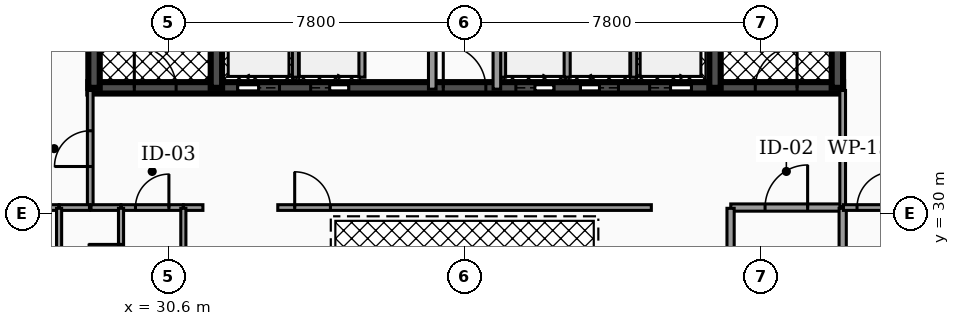
"""IFC4 building model, lengths in metres.
Left out: names, types, materials, properties, quantities, classifications, styles, units other than length and angle.
Written with IfcOpenShell. Run it as: python <this file> out.ifc"""

import sys

from ifc_helpers import new_model, si_unit, direction, frame, frame_2d, origin, place, context, subcontext, project, spatial, rectangle, extrude, element, fill, save


model = new_model("IFC4")
c1 = context("Model", 3, precision=1e-05, world=origin(), true_north=direction((0.0, 1.0)))
c2 = subcontext(c1, "Body", "Model", "MODEL_VIEW")
j1 = project(units=[si_unit("LENGTHUNIT", "METRE"), si_unit("PLANEANGLEUNIT", "RADIAN")], contexts=[c1])
p1 = place(None, origin())
s1 = spatial("IfcSite", under=j1, at=p1, CompositionType="ELEMENT")
p2 = place(p1, origin())
s2 = spatial("IfcBuilding", under=s1, at=p2, CompositionType="ELEMENT")
p3 = place(p2, frame((0.0, 0.0, 235.96)))
s3 = spatial("IfcBuildingStorey", under=s2, at=p3, CompositionType="ELEMENT", Elevation=235.96)
p4 = place(p3, frame((28.5, 33.3, 0.0), z_axis=(0.0, 0.0, 1.0), x_axis=(1.0, 0.0, 0.0)))
e1 = element("IfcWall", 1, at=p4, inside=s3, PredefinedType="SHEAR", context=c2, shape_type="SweptSolid", body=[
    extrude(rectangle(XDim=19.86, YDim=0.3, at=frame_2d((9.93, 0.0))), origin(), (0.0, 0.0, 1.0), 3.18),
])
p5 = place(p4, frame((3.93, 0.0, 0.0)))
e2 = element("IfcOpeningElement", 2, at=p5, cuts=e1, PredefinedType="OPENING", context=c2, shape_type="SweptSolid", body=[
    extrude(rectangle(XDim=1.1, YDim=2.15, at=frame_2d((0.55, 1.075))), frame((0.0, 0.16, 0.0), z_axis=(0.0, -1.0, 0.0), x_axis=(1.0, 0.0, 0.0)), (0.0, 0.0, 1.0), 0.32),
])
p6 = place(p4, frame((14.77, 0.0, 0.0)))
e3 = element("IfcOpeningElement", 3, at=p6, cuts=e1, PredefinedType="OPENING", context=c2, shape_type="SweptSolid", body=[
    extrude(rectangle(XDim=1.1, YDim=2.15, at=frame_2d((0.55, 1.075))), frame((0.0, 0.16, 0.0), z_axis=(0.0, -1.0, 0.0), x_axis=(1.0, 0.0, 0.0)), (0.0, 0.0, 1.0), 0.32),
])
p7 = place(p4, frame((11.25, 0.0, 0.0)))
e4 = element("IfcOpeningElement", 4, at=p7, cuts=e1, PredefinedType="OPENING", context=c2, shape_type="SweptSolid", body=[
    extrude(rectangle(XDim=1.0, YDim=2.1, at=frame_2d((0.5, 1.05))), frame((0.0, 0.16, 0.0), z_axis=(0.0, -1.0, 0.0), x_axis=(1.0, 0.0, 0.0)), (0.0, 0.0, 1.0), 0.32),
])
p8 = place(p4, frame((12.95, 0.0, 0.0)))
e5 = element("IfcOpeningElement", 5, at=p8, cuts=e1, PredefinedType="OPENING", context=c2, shape_type="SweptSolid", body=[
    extrude(rectangle(XDim=1.0, YDim=2.1, at=frame_2d((0.5, 1.05))), frame((0.0, 0.16, 0.0), z_axis=(0.0, -1.0, 0.0), x_axis=(1.0, 0.0, 0.0)), (0.0, 0.0, 1.0), 0.32),
])
p9 = place(p4, frame((5.85, 0.0, 0.0)))
e6 = element("IfcOpeningElement", 6, at=p9, cuts=e1, PredefinedType="OPENING", context=c2, shape_type="SweptSolid", body=[
    extrude(rectangle(XDim=1.0, YDim=2.1, at=frame_2d((0.5, 1.05))), frame((0.0, 0.16, 0.0), z_axis=(0.0, -1.0, 0.0), x_axis=(1.0, 0.0, 0.0)), (0.0, 0.0, 1.0), 0.32),
])
p10 = place(p4, frame((1.21, 0.0, 0.0)))
e7 = element("IfcOpeningElement", 7, at=p10, cuts=e1, PredefinedType="OPENING", context=c2, shape_type="SweptSolid", body=[
    extrude(rectangle(XDim=1.1, YDim=2.2, at=frame_2d((0.55, 1.1))), frame((0.0, 0.16, 0.0), z_axis=(0.0, -1.0, 0.0), x_axis=(1.0, 0.0, 0.0)), (0.0, 0.0, 1.0), 0.32),
])
p11 = place(p4, frame((9.34, 0.0, 0.0)))
e8 = element("IfcOpeningElement", 8, at=p11, cuts=e1, PredefinedType="OPENING", context=c2, shape_type="SweptSolid", body=[
    extrude(rectangle(XDim=1.12, YDim=2.05, at=frame_2d((0.56, 1.025))), frame((0.0, 0.16, 0.0), z_axis=(0.0, -1.0, 0.0), x_axis=(1.0, 0.0, 0.0)), (0.0, 0.0, 1.0), 0.32),
])
p12 = place(p4, frame((17.55, 0.0, 0.0)))
e9 = element("IfcOpeningElement", 9, at=p12, cuts=e1, PredefinedType="OPENING", context=c2, shape_type="SweptSolid", body=[
    extrude(rectangle(XDim=1.1, YDim=2.2, at=frame_2d((0.55, 1.1))), frame((0.0, 0.16, 0.0), z_axis=(0.0, -1.0, 0.0), x_axis=(1.0, 0.0, 0.0)), (0.0, 0.0, 1.0), 0.32),
])
for number, where, z_axis, x_axis in (
    (10, (28.65, 33.3, 0.0), (0.0, 0.0, 1.0), (0.0, 1.0, 0.0)),
    (11, (31.87, 33.3, 0.0), (0.0, 0.0, 1.0), (0.0, 1.0, 0.0)),
    (12, (44.99, 33.3, 0.0), (0.0, 0.0, 1.0), (0.0, 1.0, 0.0)),
    (13, (48.21, 33.3, 0.0), (0.0, 0.0, 1.0), (0.0, 1.0, 0.0)),
):
    element("IfcWall", number, at=place(p3, frame(where, z_axis=z_axis, x_axis=x_axis)), inside=s3, PredefinedType="SHEAR", context=c2, shape_type="SweptSolid", body=[
        extrude(rectangle(XDim=10.1, YDim=0.3, at=frame_2d((5.05, 0.0))), origin(), (0.0, 0.0, 1.0), 3.18),
    ])
for number, where, z_axis, x_axis in (
    (14, (33.95, 33.58, 0.0), (0.0, 0.0, 1.0), (0.0, 1.0, 0.0)),
    (15, (42.85, 33.58, 0.0), (0.0, 0.0, 1.0), (0.0, 1.0, 0.0)),
):
    element("IfcWall", number, at=place(p3, frame(where, z_axis=z_axis, x_axis=x_axis)), inside=s3, PredefinedType="SOLIDWALL", context=c2, shape_type="SweptSolid", body=[
        extrude(rectangle(XDim=2.45, YDim=0.16, at=frame_2d((1.225, 0.0))), origin(), (0.0, 0.0, 1.0), 3.18),
    ])
for number, where, z_axis, x_axis in (
    (16, (39.4, 33.58, 0.0), (0.0, 0.0, 1.0), (0.0, 1.0, 0.0)),
    (17, (41.1, 33.58, 0.0), (0.0, 0.0, 1.0), (0.0, 1.0, 0.0)),
    (18, (35.7, 33.58, 0.0), (0.0, 0.0, 1.0), (0.0, 1.0, 0.0)),
):
    element("IfcWall", number, at=place(p3, frame(where, z_axis=z_axis, x_axis=x_axis)), inside=s3, PredefinedType="SOLIDWALL", context=c2, shape_type="SweptSolid", body=[
        extrude(rectangle(XDim=2.25, YDim=0.16, at=frame_2d((1.125, 0.0))), origin(), (0.0, 0.0, 1.0), 3.18),
    ])
p13 = place(p3, frame((37.55, 33.265, 0.0), z_axis=(0.0, 0.0, 1.0), x_axis=(0.0, 1.0, 0.0)))
e19 = element("IfcWall", 19, at=p13, inside=s3, PredefinedType="PARTITIONING", context=c2, shape_type="SweptSolid", body=[
    extrude(rectangle(XDim=4.595, YDim=0.2, at=frame_2d((2.298, 0.0))), origin(), (0.0, 0.0, 1.0), 2.235),
])
p14 = place(p13, frame((1.857, 0.0, 0.0)))
e20 = element("IfcOpeningElement", 20, at=p14, cuts=e19, PredefinedType="OPENING", context=c2, shape_type="SweptSolid", body=[
    extrude(rectangle(XDim=0.88, YDim=2.05, at=frame_2d((0.44, 1.025))), frame((0.0, 0.11, 0.0), z_axis=(0.0, -1.0, 0.0), x_axis=(1.0, 0.0, 0.0)), (0.0, 0.0, 1.0), 0.22),
])
p15 = place(p3, frame((39.25, 33.265, 0.0), z_axis=(0.0, 0.0, 1.0), x_axis=(0.0, 1.0, 0.0)))
e21 = element("IfcWall", 21, at=p15, inside=s3, PredefinedType="PARTITIONING", context=c2, shape_type="SweptSolid", body=[
    extrude(rectangle(XDim=4.595, YDim=0.2, at=frame_2d((2.298, 0.0))), origin(), (0.0, 0.0, 1.0), 2.235),
])
p16 = place(p15, frame((3.058, 0.0, 0.0)))
e22 = element("IfcOpeningElement", 22, at=p16, cuts=e21, PredefinedType="OPENING", context=c2, shape_type="SweptSolid", body=[
    extrude(rectangle(XDim=0.88, YDim=2.05, at=frame_2d((0.44, 1.025))), frame((0.0, 0.11, 0.0), z_axis=(0.0, -1.0, 0.0), x_axis=(1.0, 0.0, 0.0)), (0.0, 0.0, 1.0), 0.22),
])
p17 = place(p3, frame((45.405, 30.15, 0.0), z_axis=(0.0, 0.0, 1.0), x_axis=(1.0, 0.0, 0.0)))
e23 = element("IfcWall", 23, at=p17, inside=s3, PredefinedType="PARTITIONING", context=c2, shape_type="SweptSolid", body=[
    extrude(rectangle(XDim=2.925, YDim=0.19, at=frame_2d((1.462, 0.0))), origin(), (0.0, 0.0, 1.0), 2.235),
])
p18 = place(p17, frame((0.903, 0.0, 0.0)))
e24 = element("IfcOpeningElement", 24, at=p18, cuts=e23, PredefinedType="OPENING", context=c2, shape_type="SweptSolid", body=[
    extrude(rectangle(XDim=1.12, YDim=2.05, at=frame_2d((0.56, 1.025))), frame((0.0, 0.105, 0.0), z_axis=(0.0, -1.0, 0.0), x_axis=(1.0, 0.0, 0.0)), (0.0, 0.0, 1.0), 0.21),
])
p19 = place(p3, frame((28.55, 30.17, 0.0), z_axis=(0.0, 0.0, 1.0), x_axis=(0.0, 1.0, 0.0)))
e25 = element("IfcWall", 25, at=p19, inside=s3, PredefinedType="PARTITIONING", context=c2, shape_type="SweptSolid", body=[
    extrude(rectangle(XDim=3.06, YDim=0.15, at=frame_2d((1.53, 0.0))), origin(), (0.0, 0.0, 1.0), 2.235),
])
p20 = place(p19, frame((1.06, 0.0, 0.0)))
e26 = element("IfcOpeningElement", 26, at=p20, cuts=e25, PredefinedType="OPENING", context=c2, shape_type="SweptSolid", body=[
    extrude(rectangle(XDim=0.94, YDim=2.05, at=frame_2d((0.47, 1.025))), frame((0.0, 0.085, 0.0), z_axis=(0.0, -1.0, 0.0), x_axis=(1.0, 0.0, 0.0)), (0.0, 0.0, 1.0), 0.17),
])
p21 = place(p3, frame((48.35, 30.17, 0.0), z_axis=(0.0, 0.0, 1.0), x_axis=(0.0, 1.0, 0.0)))
e27 = element("IfcWall", 27, at=p21, inside=s3, PredefinedType="PARTITIONING", context=c2, shape_type="SweptSolid", body=[
    extrude(rectangle(XDim=3.06, YDim=0.15, at=frame_2d((1.53, 0.0))), origin(), (0.0, 0.0, 1.0), 2.235),
])
p22 = place(p3, frame((29.365, 30.15, 0.0), z_axis=(0.0, 0.0, 1.0), x_axis=(1.0, 0.0, 0.0)))
e28 = element("IfcWall", 28, at=p22, inside=s3, PredefinedType="PARTITIONING", context=c2, shape_type="SweptSolid", body=[
    extrude(rectangle(XDim=1.63, YDim=0.15, at=frame_2d((0.815, 0.0))), origin(), (0.0, 0.0, 1.0), 2.235),
])
p23 = place(p22, frame((0.375, 0.0, 0.0)))
e29 = element("IfcOpeningElement", 29, at=p23, cuts=e28, PredefinedType="OPENING", context=c2, shape_type="SweptSolid", body=[
    extrude(rectangle(XDim=0.88, YDim=2.05, at=frame_2d((0.44, 1.025))), frame((0.0, 0.085, 0.0), z_axis=(0.0, -1.0, 0.0), x_axis=(1.0, 0.0, 0.0)), (0.0, 0.0, 1.0), 0.17),
])
p24 = place(p3, frame((28.57, 30.15, 0.0), z_axis=(0.0, 0.0, 1.0), x_axis=(1.0, 0.0, 0.0)))
e30 = element("IfcWall", 30, at=p24, inside=s3, PredefinedType="PARTITIONING", context=c2, shape_type="SweptSolid", body=[
    extrude(rectangle(XDim=0.785, YDim=0.15, at=frame_2d((0.393, 0.0))), origin(), (0.0, 0.0, 1.0), 2.235),
])
p25 = place(p3, frame((33.485, 30.15, 0.0), z_axis=(0.0, 0.0, 1.0), x_axis=(1.0, 0.0, 0.0)))
e31 = element("IfcWall", 31, at=p25, inside=s3, PredefinedType="PARTITIONING", context=c2, shape_type="SweptSolid", body=[
    extrude(rectangle(XDim=9.83, YDim=0.15, at=frame_2d((4.915, 0.0))), origin(), (0.0, 0.0, 1.0), 2.235),
])
p26 = place(p25, frame((0.445, 0.0, 0.0)))
e32 = element("IfcOpeningElement", 32, at=p26, cuts=e31, PredefinedType="OPENING", context=c2, shape_type="SweptSolid", body=[
    extrude(rectangle(XDim=0.94, YDim=2.05, at=frame_2d((0.47, 1.025))), frame((0.0, 0.085, 0.0), z_axis=(0.0, -1.0, 0.0), x_axis=(1.0, 0.0, 0.0)), (0.0, 0.0, 1.0), 0.17),
])
p27 = place(p3, frame((31.005, 30.15, 0.0), z_axis=(0.0, 0.0, 1.0), x_axis=(1.0, 0.0, 0.0)))
e33 = element("IfcWall", 33, at=p27, inside=s3, PredefinedType="PARTITIONING", context=c2, shape_type="SweptSolid", body=[
    extrude(rectangle(XDim=0.51, YDim=0.15, at=frame_2d((0.255, 0.0))), origin(), (0.0, 0.0, 1.0), 2.235),
])
for number, where, z_axis, x_axis in (
    (34, (45.4, 27.37, 0.0), (0.0, 0.0, 1.0), (0.0, 1.0, 0.0)),
    (35, (48.35, 27.37, 0.0), (0.0, 0.0, 1.0), (0.0, 1.0, 0.0)),
):
    element("IfcWall", number, at=place(p3, frame(where, z_axis=z_axis, x_axis=x_axis)), inside=s3, PredefinedType="PARTITIONING", context=c2, shape_type="SweptSolid", body=[
        extrude(rectangle(XDim=2.76, YDim=0.19, at=frame_2d((1.38, 0.0))), origin(), (0.0, 0.0, 1.0), 2.235),
    ])
p28 = place(p3, frame((26.775, 30.15, 0.0), z_axis=(0.0, 0.0, 1.0), x_axis=(1.0, 0.0, 0.0)))
e36 = element("IfcWall", 36, at=p28, inside=s3, PredefinedType="PARTITIONING", context=c2, shape_type="SweptSolid", body=[
    extrude(rectangle(XDim=0.95, YDim=0.15, at=frame_2d((0.475, 0.0))), origin(), (0.0, 0.0, 1.0), 2.235),
])
p29 = place(p3, frame((27.735, 30.15, 0.0), z_axis=(0.0, 0.0, 1.0), x_axis=(1.0, 0.0, 0.0)))
e37 = element("IfcWall", 37, at=p29, inside=s3, PredefinedType="PARTITIONING", context=c2, shape_type="SweptSolid", body=[
    extrude(rectangle(XDim=0.795, YDim=0.15, at=frame_2d((0.397, 0.0))), origin(), (0.0, 0.0, 1.0), 2.235),
])
p30 = place(p3, frame((48.37, 30.15, 0.0), z_axis=(0.0, 0.0, 1.0), x_axis=(1.0, 0.0, 0.0)))
e38 = element("IfcWall", 38, at=p30, inside=s3, PredefinedType="PARTITIONING", context=c2, shape_type="SweptSolid", body=[
    extrude(rectangle(XDim=1.655, YDim=0.15, at=frame_2d((0.828, 0.0))), origin(), (0.0, 0.0, 1.0), 2.235),
])
p31 = place(p30, frame((0.358, 0.0, 0.0)))
e39 = element("IfcOpeningElement", 39, at=p31, cuts=e38, PredefinedType="OPENING", context=c2, shape_type="SweptSolid", body=[
    extrude(rectangle(XDim=0.94, YDim=2.05, at=frame_2d((0.47, 1.025))), frame((0.0, 0.085, 0.0), z_axis=(0.0, -1.0, 0.0), x_axis=(1.0, 0.0, 0.0)), (0.0, 0.0, 1.0), 0.17),
])
p32 = place(p3, frame((29.36, 27.37, 0.0), z_axis=(0.0, 0.0, 1.0), x_axis=(0.0, 1.0, 0.0)))
e40 = element("IfcWall", 40, at=p32, inside=s3, PredefinedType="PARTITIONING", context=c2, shape_type="SweptSolid", body=[
    extrude(rectangle(XDim=2.76, YDim=0.135, at=frame_2d((1.38, 0.0))), origin(), (0.0, 0.0, 1.0), 2.235),
])
p33 = place(p32, frame((0.95, 0.0, 0.0)))
e41 = element("IfcOpeningElement", 41, at=p33, cuts=e40, PredefinedType="OPENING", context=c2, shape_type="SweptSolid", body=[
    extrude(rectangle(XDim=0.86, YDim=2.05, at=frame_2d((0.43, 1.025))), frame((0.0, 0.077, 0.0), z_axis=(0.0, -1.0, 0.0), x_axis=(1.0, 0.0, 0.0)), (0.0, 0.0, 1.0), 0.155),
])
for number, where, z_axis, x_axis in (
    (42, (31.0, 27.37, 0.0), (0.0, 0.0, 1.0), (0.0, 1.0, 0.0)),
    (43, (27.73, 27.37, 0.0), (0.0, 0.0, 1.0), (0.0, 1.0, 0.0)),
):
    element("IfcWall", number, at=place(p3, frame(where, z_axis=z_axis, x_axis=x_axis)), inside=s3, PredefinedType="PARTITIONING", context=c2, shape_type="SweptSolid", body=[
        extrude(rectangle(XDim=2.76, YDim=0.135, at=frame_2d((1.38, 0.0))), origin(), (0.0, 0.0, 1.0), 2.235),
    ])
p34 = place(p5, origin())
e44 = element("IfcDoor", 44, at=p34, inside=s3, OperationType="SLIDING_TO_LEFT", PredefinedType="DOOR", context=c2, shape_type="SweptSolid", body=[
    extrude(rectangle(XDim=1.1, YDim=2.15, at=frame_2d((0.55, 1.075))), frame((0.0, 0.025, 0.0), z_axis=(0.0, -1.0, 0.0), x_axis=(1.0, 0.0, 0.0)), (0.0, 0.0, 1.0), 0.05),
])
fill(e2, e44)
p35 = place(p6, origin())
e45 = element("IfcDoor", 45, at=p35, inside=s3, OperationType="SLIDING_TO_RIGHT", PredefinedType="DOOR", context=c2, shape_type="SweptSolid", body=[
    extrude(rectangle(XDim=1.1, YDim=2.15, at=frame_2d((0.55, 1.075))), frame((0.0, 0.025, 0.0), z_axis=(0.0, -1.0, 0.0), x_axis=(1.0, 0.0, 0.0)), (0.0, 0.0, 1.0), 0.05),
])
fill(e3, e45)
p36 = place(p7, origin())
e46 = element("IfcDoor", 46, at=p36, inside=s3, OperationType="SLIDING_TO_RIGHT", PredefinedType="DOOR", context=c2, shape_type="SweptSolid", body=[
    extrude(rectangle(XDim=1.0, YDim=2.1, at=frame_2d((0.5, 1.05))), frame((0.0, 0.025, 0.0), z_axis=(0.0, -1.0, 0.0), x_axis=(1.0, 0.0, 0.0)), (0.0, 0.0, 1.0), 0.05),
])
fill(e4, e46)
p37 = place(p8, origin())
e47 = element("IfcDoor", 47, at=p37, inside=s3, OperationType="SLIDING_TO_LEFT", PredefinedType="DOOR", context=c2, shape_type="SweptSolid", body=[
    extrude(rectangle(XDim=1.0, YDim=2.1, at=frame_2d((0.5, 1.05))), frame((0.0, 0.025, 0.0), z_axis=(0.0, -1.0, 0.0), x_axis=(1.0, 0.0, 0.0)), (0.0, 0.0, 1.0), 0.05),
])
fill(e5, e47)
p38 = place(p9, origin())
e48 = element("IfcDoor", 48, at=p38, inside=s3, OperationType="SLIDING_TO_RIGHT", PredefinedType="DOOR", context=c2, shape_type="SweptSolid", body=[
    extrude(rectangle(XDim=1.0, YDim=2.1, at=frame_2d((0.5, 1.05))), frame((0.0, 0.025, 0.0), z_axis=(0.0, -1.0, 0.0), x_axis=(1.0, 0.0, 0.0)), (0.0, 0.0, 1.0), 0.05),
])
fill(e6, e48)
p39 = place(p10, origin())
e49 = element("IfcDoor", 49, at=p39, inside=s3, OperationType="SINGLE_SWING_LEFT", PredefinedType="DOOR", context=c2, shape_type="SweptSolid", body=[
    extrude(rectangle(XDim=1.1, YDim=2.2, at=frame_2d((0.55, 1.1))), frame((0.0, 0.025, 0.0), z_axis=(0.0, -1.0, 0.0), x_axis=(1.0, 0.0, 0.0)), (0.0, 0.0, 1.0), 0.05),
])
fill(e7, e49)
p40 = place(p11, origin())
e50 = element("IfcDoor", 50, at=p40, inside=s3, OperationType="SINGLE_SWING_LEFT", PredefinedType="DOOR", context=c2, shape_type="SweptSolid", body=[
    extrude(rectangle(XDim=1.12, YDim=2.05, at=frame_2d((0.56, 1.025))), frame((0.0, 0.025, 0.0), z_axis=(0.0, -1.0, 0.0), x_axis=(1.0, 0.0, 0.0)), (0.0, 0.0, 1.0), 0.05),
])
fill(e8, e50)
p41 = place(p12, origin())
e51 = element("IfcDoor", 51, at=p41, inside=s3, OperationType="SINGLE_SWING_RIGHT", PredefinedType="DOOR", context=c2, shape_type="SweptSolid", body=[
    extrude(rectangle(XDim=1.1, YDim=2.2, at=frame_2d((0.55, 1.1))), frame((0.0, 0.025, 0.0), z_axis=(0.0, -1.0, 0.0), x_axis=(1.0, 0.0, 0.0)), (0.0, 0.0, 1.0), 0.05),
])
fill(e9, e51)
p42 = place(p18, origin())
e52 = element("IfcDoor", 52, at=p42, inside=s3, OperationType="SINGLE_SWING_RIGHT", PredefinedType="DOOR", context=c2, shape_type="SweptSolid", body=[
    extrude(rectangle(XDim=1.12, YDim=2.05, at=frame_2d((0.56, 1.025))), frame((0.0, 0.025, 0.0), z_axis=(0.0, -1.0, 0.0), x_axis=(1.0, 0.0, 0.0)), (0.0, 0.0, 1.0), 0.05),
])
fill(e24, e52)
p43 = place(p20, origin())
e53 = element("IfcDoor", 53, at=p43, inside=s3, OperationType="SINGLE_SWING_LEFT", PredefinedType="DOOR", context=c2, shape_type="SweptSolid", body=[
    extrude(rectangle(XDim=0.94, YDim=2.05, at=frame_2d((0.47, 1.025))), frame((0.0, 0.025, 0.0), z_axis=(0.0, -1.0, 0.0), x_axis=(1.0, 0.0, 0.0)), (0.0, 0.0, 1.0), 0.05),
])
fill(e26, e53)
p44 = place(p23, origin())
e54 = element("IfcDoor", 54, at=p44, inside=s3, OperationType="SINGLE_SWING_RIGHT", PredefinedType="DOOR", context=c2, shape_type="SweptSolid", body=[
    extrude(rectangle(XDim=0.88, YDim=2.05, at=frame_2d((0.44, 1.025))), frame((0.0, 0.025, 0.0), z_axis=(0.0, -1.0, 0.0), x_axis=(1.0, 0.0, 0.0)), (0.0, 0.0, 1.0), 0.05),
])
fill(e29, e54)
p45 = place(p26, origin())
e55 = element("IfcDoor", 55, at=p45, inside=s3, OperationType="SINGLE_SWING_LEFT", PredefinedType="DOOR", context=c2, shape_type="SweptSolid", body=[
    extrude(rectangle(XDim=0.94, YDim=2.05, at=frame_2d((0.47, 1.025))), frame((0.0, 0.025, 0.0), z_axis=(0.0, -1.0, 0.0), x_axis=(1.0, 0.0, 0.0)), (0.0, 0.0, 1.0), 0.05),
])
fill(e32, e55)
p46 = place(p31, origin())
e56 = element("IfcDoor", 56, at=p46, inside=s3, OperationType="SINGLE_SWING_RIGHT", PredefinedType="DOOR", context=c2, shape_type="SweptSolid", body=[
    extrude(rectangle(XDim=0.94, YDim=2.05, at=frame_2d((0.47, 1.025))), frame((0.0, 0.025, 0.0), z_axis=(0.0, -1.0, 0.0), x_axis=(1.0, 0.0, 0.0)), (0.0, 0.0, 1.0), 0.05),
])
fill(e39, e56)
p47 = place(p33, origin())
e57 = element("IfcDoor", 57, at=p47, inside=s3, OperationType="SINGLE_SWING_RIGHT", PredefinedType="DOOR", context=c2, shape_type="SweptSolid", body=[
    extrude(rectangle(XDim=0.86, YDim=2.05, at=frame_2d((0.43, 1.025))), frame((0.0, 0.025, 0.0), z_axis=(0.0, -1.0, 0.0), x_axis=(1.0, 0.0, 0.0)), (0.0, 0.0, 1.0), 0.05),
])
fill(e41, e57)
save(model, sys.argv[1])
